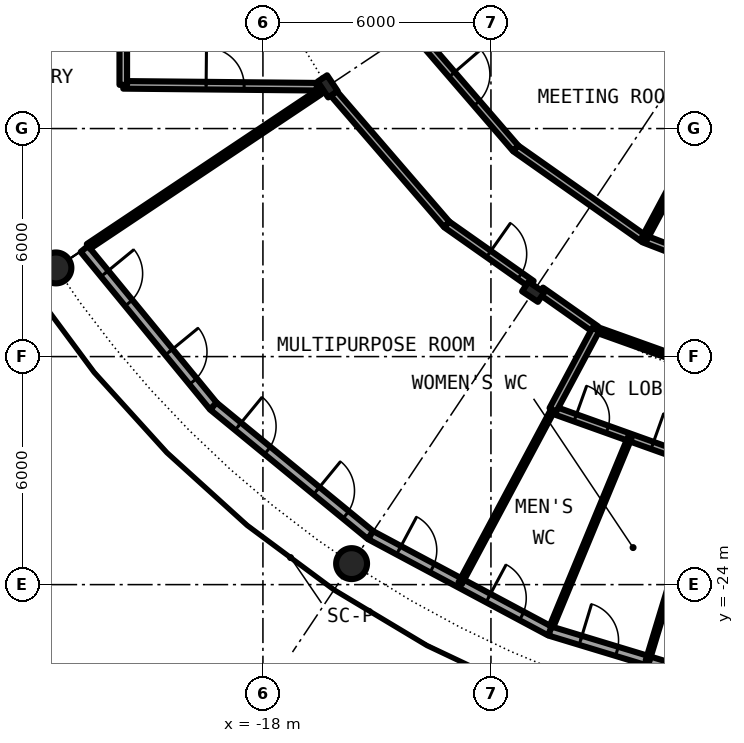
"""IFC4 building model, lengths in metres.
Left out: names, types, materials, properties, quantities, classifications, styles, units other than length and angle.
Written with IfcOpenShell. Run it as: python <this file> out.ifc"""

import sys

from ifc_helpers import new_model, si_unit, direction, frame, frame_2d, origin, origin_2d, place, context, subcontext, project, spatial, rectangle, hollow_circle, i_section, extrude, element, fill, save


model = new_model("IFC4")
c1 = context("Model", 3, precision=1e-05, world=origin(), true_north=direction((0.0, 1.0)))
c2 = subcontext(c1, "Body", "Model", "MODEL_VIEW")
j1 = project(units=[si_unit("LENGTHUNIT", "METRE"), si_unit("PLANEANGLEUNIT", "RADIAN")], contexts=[c1])
p1 = place(None, origin())
s1 = spatial("IfcSite", under=j1, at=p1, CompositionType="ELEMENT")
p2 = place(p1, origin())
s2 = spatial("IfcBuilding", under=s1, at=p2, CompositionType="ELEMENT")
p3 = place(p2, frame((0.0, 0.0, 157.4)))
s3 = spatial("IfcBuildingStorey", under=s2, at=p3, CompositionType="ELEMENT", Elevation=157.4)
for number, where, z_axis, x_axis in (
    (1, (-23.448, -15.667, 0.0), (0.0, 0.0, 1.0), (1.0, 0.0, 0.0)),
    (2, (-15.667, -23.448, 0.0), (0.0, 0.0, 1.0), (1.0, 0.0, 0.0)),
):
    element("IfcColumn", number, at=place(p3, frame(where, z_axis=z_axis, x_axis=x_axis)), inside=s3, PredefinedType="COLUMN", context=c2, shape_type="SweptSolid", body=[
        extrude(hollow_circle(Radius=0.406, WallThickness=0.04, at=origin_2d()), origin(), (0.0, 0.0, 1.0), 4.2),
    ])
for number, where, z_axis, x_axis in (
    (3, (-16.297, -10.889, 0.0), (0.0, 0.0, 1.0), (-0.831, -0.556, 0.0)),
    (4, (-10.889, -16.297, 0.0), (0.0, 0.0, 1.0), (-0.556, -0.831, 0.0)),
):
    element("IfcColumn", number, at=place(p3, frame(where, z_axis=z_axis, x_axis=x_axis)), inside=s3, PredefinedType="COLUMN", context=c2, shape_type="SweptSolid", body=[
        extrude(i_section(OverallWidth=0.3, OverallDepth=0.5, WebThickness=0.014, FlangeThickness=0.028, FilletRadius=0.027, at=origin_2d()), origin(), (0.0, 0.0, 1.0), 4.2),
    ])
p4 = place(p3, frame((-22.699, -15.167, 0.0), z_axis=(0.0, 0.0, 1.0), x_axis=(0.634382322723, -0.773019449054, 0.0)))
e5 = element("IfcWall", 5, at=p4, inside=s3, PredefinedType="SOLIDWALL", context=c2, shape_type="SweptSolid", body=[
    extrude(rectangle(XDim=5.352, YDim=0.25, at=frame_2d((2.676, 0.0))), origin(), (0.0, 0.0, 1.0), 3.85),
])
p5 = place(p4, frame((0.841, 0.0, 0.0)))
e6 = element("IfcOpeningElement", 6, at=p5, cuts=e5, PredefinedType="OPENING", context=c2, shape_type="SweptSolid", body=[
    extrude(rectangle(XDim=1.0, YDim=2.2, at=frame_2d((0.5, 1.1))), frame((0.0, 0.135, 0.0), z_axis=(0.0, -1.0, 0.0), x_axis=(1.0, 0.0, 0.0)), (0.0, 0.0, 1.0), 0.27),
])
p6 = place(p4, frame((3.51, 0.0, 0.0)))
e7 = element("IfcOpeningElement", 7, at=p6, cuts=e5, PredefinedType="OPENING", context=c2, shape_type="SweptSolid", body=[
    extrude(rectangle(XDim=1.0, YDim=2.2, at=frame_2d((0.5, 1.1))), frame((0.0, 0.135, 0.0), z_axis=(0.0, -1.0, 0.0), x_axis=(1.0, 0.0, 0.0)), (0.0, 0.0, 1.0), 0.27),
])
p7 = place(p3, frame((-19.304, -19.304, 0.0), z_axis=(0.0, 0.0, 1.0), x_axis=(0.773019449054, -0.634382322723, 0.0)))
e8 = element("IfcWall", 8, at=p7, inside=s3, PredefinedType="SOLIDWALL", context=c2, shape_type="SweptSolid", body=[
    extrude(rectangle(XDim=5.352, YDim=0.25, at=frame_2d((2.676, 0.0))), origin(), (0.0, 0.0, 1.0), 3.85),
])
p8 = place(p7, frame((0.841, 0.0, 0.0)))
e9 = element("IfcOpeningElement", 9, at=p8, cuts=e8, PredefinedType="OPENING", context=c2, shape_type="SweptSolid", body=[
    extrude(rectangle(XDim=1.0, YDim=2.2, at=frame_2d((0.5, 1.1))), frame((0.0, 0.135, 0.0), z_axis=(0.0, -1.0, 0.0), x_axis=(1.0, 0.0, 0.0)), (0.0, 0.0, 1.0), 0.27),
])
p9 = place(p7, frame((3.51, 0.0, 0.0)))
e10 = element("IfcOpeningElement", 10, at=p9, cuts=e8, PredefinedType="OPENING", context=c2, shape_type="SweptSolid", body=[
    extrude(rectangle(XDim=1.0, YDim=2.2, at=frame_2d((0.5, 1.1))), frame((0.0, 0.135, 0.0), z_axis=(0.0, -1.0, 0.0), x_axis=(1.0, 0.0, 0.0)), (0.0, 0.0, 1.0), 0.27),
])
p10 = place(p3, frame((-15.167, -22.699, 0.0), z_axis=(0.0, 0.0, 1.0), x_axis=(0.881915646801, -0.471407246368, 0.0)))
e11 = element("IfcWall", 11, at=p10, inside=s3, PredefinedType="SOLIDWALL", context=c2, shape_type="SweptSolid", body=[
    extrude(rectangle(XDim=5.352, YDim=0.25, at=frame_2d((2.676, 0.0))), origin(), (0.0, 0.0, 1.0), 3.85),
])
p11 = place(p10, frame((0.841, 0.0, 0.0)))
e12 = element("IfcOpeningElement", 12, at=p11, cuts=e11, PredefinedType="OPENING", context=c2, shape_type="SweptSolid", body=[
    extrude(rectangle(XDim=1.0, YDim=2.2, at=frame_2d((0.5, 1.1))), frame((0.0, 0.135, 0.0), z_axis=(0.0, -1.0, 0.0), x_axis=(1.0, 0.0, 0.0)), (0.0, 0.0, 1.0), 0.27),
])
p12 = place(p10, frame((3.51, 0.0, 0.0)))
e13 = element("IfcOpeningElement", 13, at=p12, cuts=e11, PredefinedType="OPENING", context=c2, shape_type="SweptSolid", body=[
    extrude(rectangle(XDim=1.0, YDim=2.2, at=frame_2d((0.5, 1.1))), frame((0.0, 0.135, 0.0), z_axis=(0.0, -1.0, 0.0), x_axis=(1.0, 0.0, 0.0)), (0.0, 0.0, 1.0), 0.27),
])
p13 = place(p3, frame((-10.447, -25.222, 0.0), z_axis=(0.0, 0.0, 1.0), x_axis=(0.956965678721, -0.290201119486, 0.0)))
e14 = element("IfcWall", 14, at=p13, inside=s3, PredefinedType="SOLIDWALL", context=c2, shape_type="SweptSolid", body=[
    extrude(rectangle(XDim=5.351, YDim=0.25, at=frame_2d((2.676, 0.0))), origin(), (0.0, 0.0, 1.0), 3.85),
])
p14 = place(p13, frame((0.841, 0.0, 0.0)))
e15 = element("IfcOpeningElement", 15, at=p14, cuts=e14, PredefinedType="OPENING", context=c2, shape_type="SweptSolid", body=[
    extrude(rectangle(XDim=1.0, YDim=2.2, at=frame_2d((0.5, 1.1))), frame((0.0, 0.135, 0.0), z_axis=(0.0, -1.0, 0.0), x_axis=(1.0, 0.0, 0.0)), (0.0, 0.0, 1.0), 0.27),
])
p15 = place(p13, frame((3.51, 0.0, 0.0)))
e16 = element("IfcOpeningElement", 16, at=p15, cuts=e14, PredefinedType="OPENING", context=c2, shape_type="SweptSolid", body=[
    extrude(rectangle(XDim=1.0, YDim=2.2, at=frame_2d((0.5, 1.1))), frame((0.0, 0.135, 0.0), z_axis=(0.0, -1.0, 0.0), x_axis=(1.0, 0.0, 0.0)), (0.0, 0.0, 1.0), 0.27),
])
p16 = place(p3, frame((-10.373, -19.401, 0.0), z_axis=(0.0, 0.0, 1.0), x_axis=(0.941534771306, -0.336915826909, 0.0)))
e17 = element("IfcWall", 17, at=p16, inside=s3, PredefinedType="PARTITIONING", context=c2, shape_type="SweptSolid", body=[
    extrude(rectangle(XDim=6.459, YDim=0.2, at=frame_2d((3.229, 0.0))), origin(), (0.0, 0.0, 1.0), 3.85),
])
p17 = place(p16, frame((0.627, 0.0, 0.0)))
e18 = element("IfcOpeningElement", 18, at=p17, cuts=e17, PredefinedType="OPENING", context=c2, shape_type="SweptSolid", body=[
    extrude(rectangle(XDim=0.9, YDim=2.3, at=frame_2d((0.45, 1.15))), frame((0.0, 0.11, 0.0), z_axis=(0.0, -1.0, 0.0), x_axis=(1.0, 0.0, 0.0)), (0.0, 0.0, 1.0), 0.22),
])
p18 = place(p16, frame((2.781, 0.0, 0.0)))
e19 = element("IfcOpeningElement", 19, at=p18, cuts=e17, PredefinedType="OPENING", context=c2, shape_type="SweptSolid", body=[
    extrude(rectangle(XDim=0.9, YDim=2.3, at=frame_2d((0.45, 1.15))), frame((0.0, 0.11, 0.0), z_axis=(0.0, -1.0, 0.0), x_axis=(1.0, 0.0, 0.0)), (0.0, 0.0, 1.0), 0.22),
])
p19 = place(p16, frame((4.933, 0.0, 0.0)))
e20 = element("IfcOpeningElement", 20, at=p19, cuts=e17, PredefinedType="OPENING", context=c2, shape_type="SweptSolid", body=[
    extrude(rectangle(XDim=0.9, YDim=2.3, at=frame_2d((0.45, 1.15))), frame((0.0, 0.11, 0.0), z_axis=(0.0, -1.0, 0.0), x_axis=(1.0, 0.0, 0.0)), (0.0, 0.0, 1.0), 0.22),
])
p20 = place(p3, frame((-16.198, -11.004, 0.0), z_axis=(0.0, 0.0, 1.0), x_axis=(0.653094461639, -0.757276451619, 0.0)))
e21 = element("IfcWall", 21, at=p20, inside=s3, PredefinedType="PARTITIONING", context=c2, shape_type="SweptSolid", body=[
    extrude(rectangle(XDim=4.647, YDim=0.2, at=frame_2d((2.323, 0.0))), origin(), (0.0, 0.0, 1.0), 3.54),
])
p21 = place(p3, frame((-13.163, -14.523, 0.0), z_axis=(0.0, 0.0, 1.0), x_axis=(0.817664396292, -0.57569517545, 0.0)))
e22 = element("IfcWall", 22, at=p21, inside=s3, PredefinedType="PARTITIONING", context=c2, shape_type="SweptSolid", body=[
    extrude(rectangle(XDim=2.727, YDim=0.2, at=frame_2d((1.364, 0.0))), origin(), (0.0, 0.0, 1.0), 3.54),
])
p22 = place(p21, frame((1.35, 0.0, 0.0)))
e23 = element("IfcOpeningElement", 23, at=p22, cuts=e22, PredefinedType="OPENING", context=c2, shape_type="SweptSolid", body=[
    extrude(rectangle(XDim=1.0, YDim=2.3, at=frame_2d((0.5, 1.15))), frame((0.0, 0.11, 0.0), z_axis=(0.0, -1.0, 0.0), x_axis=(1.0, 0.0, 0.0)), (0.0, 0.0, 1.0), 0.22),
])
p23 = place(p3, frame((-10.688, -16.266, 0.0), z_axis=(0.0, 0.0, 1.0), x_axis=(0.817772792535, -0.575541188613, 0.0)))
e24 = element("IfcWall", 24, at=p23, inside=s3, PredefinedType="PARTITIONING", context=c2, shape_type="SweptSolid", body=[
    extrude(rectangle(XDim=1.772, YDim=0.2, at=frame_2d((0.886, 0.0))), origin(), (0.0, 0.0, 1.0), 3.54),
])
p24 = place(p3, frame((-9.239, -17.286, 0.0), z_axis=(0.0, 0.0, 1.0), x_axis=(0.941550382061, -0.336872198379, 0.0)))
e25 = element("IfcWall", 25, at=p24, inside=s3, PredefinedType="PARTITIONING", context=c2, shape_type="SweptSolid", body=[
    extrude(rectangle(XDim=5.599, YDim=0.15, at=frame_2d((2.8, 0.0))), origin(), (0.0, 0.0, 1.0), 3.54),
])
p25 = place(p24, frame((2.376, 0.0, 0.0)))
e26 = element("IfcOpeningElement", 26, at=p25, cuts=e25, PredefinedType="OPENING", context=c2, shape_type="SweptSolid", body=[
    extrude(rectangle(XDim=1.0, YDim=2.3, at=frame_2d((0.5, 1.15))), frame((0.0, 0.085, 0.0), z_axis=(0.0, -1.0, 0.0), x_axis=(1.0, 0.0, 0.0)), (0.0, 0.0, 1.0), 0.17),
])
p26 = place(p3, frame((-14.086, -9.35, 0.0), z_axis=(0.0, 0.0, 1.0), x_axis=(0.653273870261, -0.757121687996, 0.0)))
e27 = element("IfcWall", 27, at=p26, inside=s3, PredefinedType="PARTITIONING", context=c2, shape_type="SweptSolid", body=[
    extrude(rectangle(XDim=4.189, YDim=0.2, at=frame_2d((2.095, 0.0))), origin(), (0.0, 0.0, 1.0), 3.85),
])
p27 = place(p26, frame((1.621, 0.0, 0.0)))
e28 = element("IfcOpeningElement", 28, at=p27, cuts=e27, PredefinedType="OPENING", context=c2, shape_type="SweptSolid", body=[
    extrude(rectangle(XDim=1.0, YDim=2.3, at=frame_2d((0.5, 1.15))), frame((0.0, 0.11, 0.0), z_axis=(0.0, -1.0, 0.0), x_axis=(1.0, 0.0, 0.0)), (0.0, 0.0, 1.0), 0.22),
])
p28 = place(p3, frame((-11.349, -12.522, 0.0), z_axis=(0.0, 0.0, 1.0), x_axis=(0.817567680547, -0.575832517079, 0.0)))
e29 = element("IfcWall", 29, at=p28, inside=s3, PredefinedType="PARTITIONING", context=c2, shape_type="SweptSolid", body=[
    extrude(rectangle(XDim=4.137, YDim=0.2, at=frame_2d((2.068, 0.0))), origin(), (0.0, 0.0, 1.0), 3.85),
])
p29 = place(p3, frame((-7.967, -14.904, 0.0), z_axis=(0.0, 0.0, 1.0), x_axis=(0.932943640288, -0.360022449363, 0.0)))
e30 = element("IfcWall", 30, at=p29, inside=s3, PredefinedType="PARTITIONING", context=c2, shape_type="SweptSolid", body=[
    extrude(rectangle(XDim=4.139, YDim=0.2, at=frame_2d((2.069, 0.0))), origin(), (0.0, 0.0, 1.0), 3.85),
])
p30 = place(p29, frame((1.569, 0.0, 0.0)))
e31 = element("IfcOpeningElement", 31, at=p30, cuts=e30, PredefinedType="OPENING", context=c2, shape_type="SweptSolid", body=[
    extrude(rectangle(XDim=1.0, YDim=2.3, at=frame_2d((0.5, 1.15))), frame((0.0, 0.11, 0.0), z_axis=(0.0, -1.0, 0.0), x_axis=(1.0, 0.0, 0.0)), (0.0, 0.0, 1.0), 0.22),
])
p31 = place(p3, frame((-21.675, -10.85, 0.0), z_axis=(0.0, 0.0, 1.0), x_axis=(0.999954045313, -0.009586827528, 0.0)))
e32 = element("IfcWall", 32, at=p31, inside=s3, PredefinedType="PARTITIONING", context=c2, shape_type="SweptSolid", body=[
    extrude(rectangle(XDim=5.093, YDim=0.2, at=frame_2d((2.547, 0.0))), origin(), (0.0, 0.0, 1.0), 3.85),
])
p32 = place(p31, frame((2.18, 0.0, 0.0)))
e33 = element("IfcOpeningElement", 33, at=p32, cuts=e32, PredefinedType="OPENING", context=c2, shape_type="SweptSolid", body=[
    extrude(rectangle(XDim=1.0, YDim=2.3, at=frame_2d((0.5, 1.15))), frame((0.0, 0.11, 0.0), z_axis=(0.0, -1.0, 0.0), x_axis=(1.0, 0.0, 0.0)), (0.0, 0.0, 1.0), 0.22),
])
p33 = place(p3, frame((-22.593, -15.101, 0.0), z_axis=(0.0, 0.0, 1.0), x_axis=(0.831419048668, 0.555645899393, 0.0)))
e34 = element("IfcWall", 34, at=p33, inside=s3, PredefinedType="PARTITIONING", context=c2, shape_type="SweptSolid", body=[
    extrude(rectangle(XDim=7.325, YDim=0.15, at=frame_2d((3.663, 0.0))), origin(), (0.0, 0.0, 1.0), 3.85),
])
p34 = place(p3, frame((-12.81, -23.966, 0.0), z_axis=(0.0, 0.0, 1.0), x_axis=(0.471464572183, 0.88188500224, 0.0)))
e35 = element("IfcWall", 35, at=p34, inside=s3, PredefinedType="PARTITIONING", context=c2, shape_type="SweptSolid", body=[
    extrude(rectangle(XDim=5.175, YDim=0.1, at=frame_2d((2.588, 0.0))), origin(), (0.0, 0.0, 1.0), 3.85),
])
p35 = place(p3, frame((-10.407, -25.103, 0.0), z_axis=(0.0, 0.0, 1.0), x_axis=(0.382973519041, 0.923759321313, 0.0)))
e36 = element("IfcWall", 36, at=p35, inside=s3, PredefinedType="PARTITIONING", context=c2, shape_type="SweptSolid", body=[
    extrude(rectangle(XDim=5.387, YDim=0.1, at=frame_2d((2.693, 0.0))), origin(), (0.0, 0.0, 1.0), 3.85),
])
p36 = place(p3, frame((-10.37, -19.402, 0.0), z_axis=(0.0, 0.0, 1.0), x_axis=(0.471385457832, 0.881927293004, 0.0)))
e37 = element("IfcWall", 37, at=p36, inside=s3, PredefinedType="PARTITIONING", context=c2, shape_type="SweptSolid", body=[
    extrude(rectangle(XDim=2.399, YDim=0.2, at=frame_2d((1.2, 0.0))), origin(), (0.0, 0.0, 1.0), 3.85),
])
p37 = place(p3, frame((-7.966, -14.905, 0.0), z_axis=(0.0, 0.0, 1.0), x_axis=(0.471460365694, 0.881887251059, 0.0)))
e38 = element("IfcWall", 38, at=p37, inside=s3, PredefinedType="PARTITIONING", context=c2, shape_type="SweptSolid", body=[
    extrude(rectangle(XDim=9.18, YDim=0.15, at=frame_2d((4.59, 0.0))), origin(), (0.0, 0.0, 1.0), 3.85),
])
p38 = place(p3, frame((-7.88, -26.007, 0.0), z_axis=(0.0, 0.0, 1.0), x_axis=(0.289945753839, 0.957043081492, 0.0)))
e39 = element("IfcWall", 39, at=p38, inside=s3, PredefinedType="PARTITIONING", context=c2, shape_type="SweptSolid", body=[
    extrude(rectangle(XDim=5.386, YDim=0.1, at=frame_2d((2.693, 0.0))), origin(), (0.0, 0.0, 1.0), 3.85),
])
p39 = place(p3, frame((-21.675, -10.85, 0.0), z_axis=(0.0, 0.0, 1.0), x_axis=(0.0, 1.0, 0.0)))
e40 = element("IfcWall", 40, at=p39, inside=s3, PredefinedType="PARTITIONING", context=c2, shape_type="SweptSolid", body=[
    extrude(rectangle(XDim=1.75, YDim=0.2, at=frame_2d((0.875, 0.0))), origin(), (0.0, 0.0, 1.0), 3.85),
])
p40 = place(p5, origin())
e41 = element("IfcDoor", 41, at=p40, inside=s3, OperationType="SINGLE_SWING_LEFT", PredefinedType="DOOR", context=c2, shape_type="SweptSolid", body=[
    extrude(rectangle(XDim=1.0, YDim=2.2, at=frame_2d((0.5, 1.1))), frame((0.0, 0.025, 0.0), z_axis=(0.0, -1.0, 0.0), x_axis=(1.0, 0.0, 0.0)), (0.0, 0.0, 1.0), 0.05),
])
fill(e6, e41)
p41 = place(p6, origin())
e42 = element("IfcDoor", 42, at=p41, inside=s3, OperationType="SINGLE_SWING_LEFT", PredefinedType="DOOR", context=c2, shape_type="SweptSolid", body=[
    extrude(rectangle(XDim=1.0, YDim=2.2, at=frame_2d((0.5, 1.1))), frame((0.0, 0.025, 0.0), z_axis=(0.0, -1.0, 0.0), x_axis=(1.0, 0.0, 0.0)), (0.0, 0.0, 1.0), 0.05),
])
fill(e7, e42)
p42 = place(p8, origin())
e43 = element("IfcDoor", 43, at=p42, inside=s3, OperationType="SINGLE_SWING_LEFT", PredefinedType="DOOR", context=c2, shape_type="SweptSolid", body=[
    extrude(rectangle(XDim=1.0, YDim=2.2, at=frame_2d((0.5, 1.1))), frame((0.0, 0.025, 0.0), z_axis=(0.0, -1.0, 0.0), x_axis=(1.0, 0.0, 0.0)), (0.0, 0.0, 1.0), 0.05),
])
fill(e9, e43)
p43 = place(p9, origin())
e44 = element("IfcDoor", 44, at=p43, inside=s3, OperationType="SINGLE_SWING_LEFT", PredefinedType="DOOR", context=c2, shape_type="SweptSolid", body=[
    extrude(rectangle(XDim=1.0, YDim=2.2, at=frame_2d((0.5, 1.1))), frame((0.0, 0.025, 0.0), z_axis=(0.0, -1.0, 0.0), x_axis=(1.0, 0.0, 0.0)), (0.0, 0.0, 1.0), 0.05),
])
fill(e10, e44)
p44 = place(p11, origin())
e45 = element("IfcDoor", 45, at=p44, inside=s3, OperationType="SINGLE_SWING_LEFT", PredefinedType="DOOR", context=c2, shape_type="SweptSolid", body=[
    extrude(rectangle(XDim=1.0, YDim=2.2, at=frame_2d((0.5, 1.1))), frame((0.0, 0.025, 0.0), z_axis=(0.0, -1.0, 0.0), x_axis=(1.0, 0.0, 0.0)), (0.0, 0.0, 1.0), 0.05),
])
fill(e12, e45)
p45 = place(p12, origin())
e46 = element("IfcDoor", 46, at=p45, inside=s3, OperationType="SINGLE_SWING_LEFT", PredefinedType="DOOR", context=c2, shape_type="SweptSolid", body=[
    extrude(rectangle(XDim=1.0, YDim=2.2, at=frame_2d((0.5, 1.1))), frame((0.0, 0.025, 0.0), z_axis=(0.0, -1.0, 0.0), x_axis=(1.0, 0.0, 0.0)), (0.0, 0.0, 1.0), 0.05),
])
fill(e13, e46)
p46 = place(p14, origin())
e47 = element("IfcDoor", 47, at=p46, inside=s3, OperationType="SINGLE_SWING_LEFT", PredefinedType="DOOR", context=c2, shape_type="SweptSolid", body=[
    extrude(rectangle(XDim=1.0, YDim=2.2, at=frame_2d((0.5, 1.1))), frame((0.0, 0.025, 0.0), z_axis=(0.0, -1.0, 0.0), x_axis=(1.0, 0.0, 0.0)), (0.0, 0.0, 1.0), 0.05),
])
fill(e15, e47)
p47 = place(p17, origin())
e48 = element("IfcDoor", 48, at=p47, inside=s3, OperationType="SINGLE_SWING_LEFT", PredefinedType="DOOR", context=c2, shape_type="SweptSolid", body=[
    extrude(rectangle(XDim=0.9, YDim=2.3, at=frame_2d((0.45, 1.15))), frame((0.0, 0.025, 0.0), z_axis=(0.0, -1.0, 0.0), x_axis=(1.0, 0.0, 0.0)), (0.0, 0.0, 1.0), 0.05),
])
fill(e18, e48)
p48 = place(p18, origin())
e49 = element("IfcDoor", 49, at=p48, inside=s3, OperationType="SINGLE_SWING_RIGHT", PredefinedType="DOOR", context=c2, shape_type="SweptSolid", body=[
    extrude(rectangle(XDim=0.9, YDim=2.3, at=frame_2d((0.45, 1.15))), frame((0.0, 0.025, 0.0), z_axis=(0.0, -1.0, 0.0), x_axis=(1.0, 0.0, 0.0)), (0.0, 0.0, 1.0), 0.05),
])
fill(e19, e49)
p49 = place(p22, origin())
e50 = element("IfcDoor", 50, at=p49, inside=s3, OperationType="SINGLE_SWING_RIGHT", PredefinedType="DOOR", context=c2, shape_type="SweptSolid", body=[
    extrude(rectangle(XDim=1.0, YDim=2.3, at=frame_2d((0.5, 1.15))), frame((0.0, 0.025, 0.0), z_axis=(0.0, -1.0, 0.0), x_axis=(1.0, 0.0, 0.0)), (0.0, 0.0, 1.0), 0.05),
])
fill(e23, e50)
p50 = place(p27, origin())
e51 = element("IfcDoor", 51, at=p50, inside=s3, OperationType="SINGLE_SWING_LEFT", PredefinedType="DOOR", context=c2, shape_type="SweptSolid", body=[
    extrude(rectangle(XDim=1.0, YDim=2.3, at=frame_2d((0.5, 1.15))), frame((0.0, 0.025, 0.0), z_axis=(0.0, -1.0, 0.0), x_axis=(1.0, 0.0, 0.0)), (0.0, 0.0, 1.0), 0.05),
])
fill(e28, e51)
p51 = place(p32, origin())
e52 = element("IfcDoor", 52, at=p51, inside=s3, OperationType="SINGLE_SWING_RIGHT", PredefinedType="DOOR", context=c2, shape_type="SweptSolid", body=[
    extrude(rectangle(XDim=1.0, YDim=2.3, at=frame_2d((0.5, 1.15))), frame((0.0, 0.025, 0.0), z_axis=(0.0, -1.0, 0.0), x_axis=(1.0, 0.0, 0.0)), (0.0, 0.0, 1.0), 0.05),
])
fill(e33, e52)
save(model, sys.argv[1])
